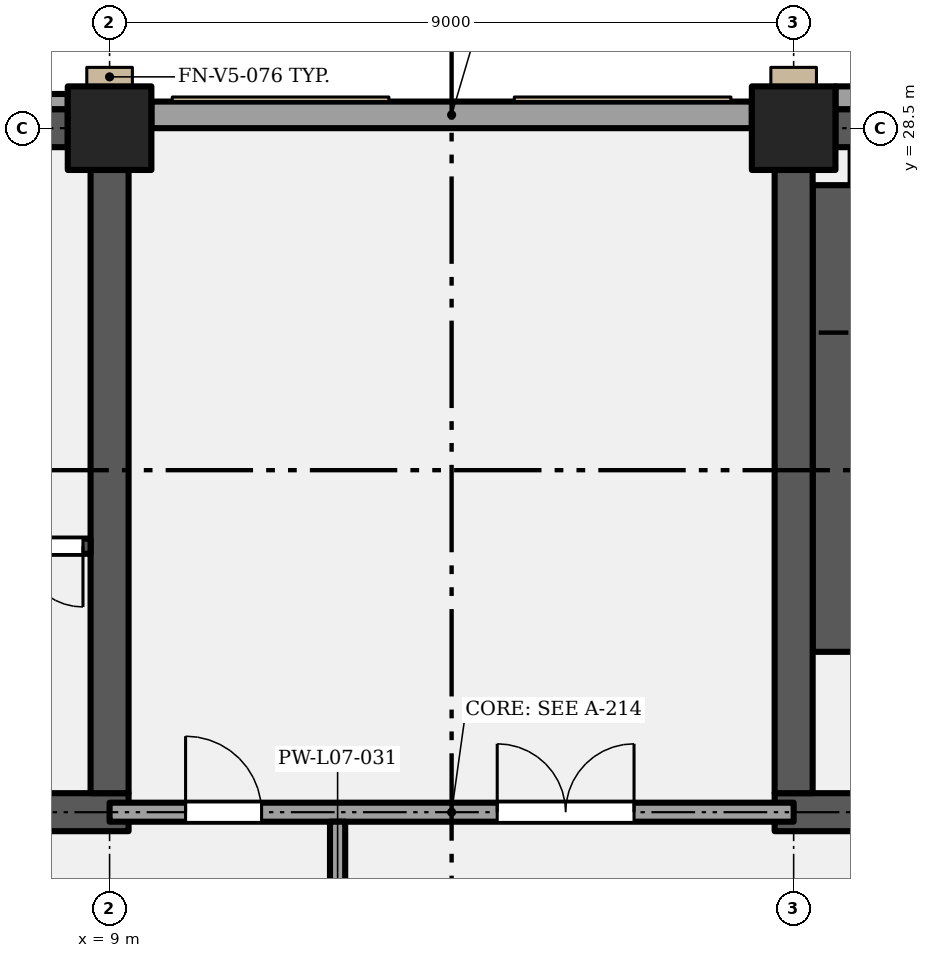
"""IFC4 building model, lengths in metres.
Left out: names, types, materials, properties, quantities, classifications, styles, units other than length and angle.
Written with IfcOpenShell. Run it as: python <this file> out.ifc"""

import sys

from ifc_helpers import new_model, si_unit, direction, frame, frame_2d, origin, origin_2d, place, context, subcontext, project, spatial, rectangle, extrude, element, fill, save


model = new_model("IFC4")
c1 = context("Model", 3, precision=1e-05, world=origin(), true_north=direction((0.0, 1.0)))
c2 = subcontext(c1, "Body", "Model", "MODEL_VIEW")
j1 = project(units=[si_unit("LENGTHUNIT", "METRE"), si_unit("PLANEANGLEUNIT", "RADIAN")], contexts=[c1])
p1 = place(None, origin())
s1 = spatial("IfcSite", under=j1, at=p1, CompositionType="ELEMENT")
p2 = place(p1, origin())
s2 = spatial("IfcBuilding", under=s1, at=p2, CompositionType="ELEMENT")
p3 = place(p2, frame((0.0, 0.0, 39.0)))
s3 = spatial("IfcBuildingStorey", under=s2, at=p3, CompositionType="ELEMENT", Elevation=39.0)
for number, where, z_axis, x_axis in (
    (1, (9.0, 28.5, 0.0), (0.0, 0.0, 1.0), (1.0, 0.0, 0.0)),
    (2, (18.0, 28.5, 0.0), (0.0, 0.0, 1.0), (1.0, 0.0, 0.0)),
):
    element("IfcColumn", number, at=place(p3, frame(where, z_axis=z_axis, x_axis=x_axis)), inside=s3, PredefinedType="COLUMN", context=c2, shape_type="SweptSolid", body=[
        extrude(rectangle(XDim=1.1, YDim=1.1, at=origin_2d()), origin(), (0.0, 0.0, 1.0), 5.4),
    ])
p4 = place(p3, frame((-0.25, 19.5, 0.0), z_axis=(0.0, 0.0, 1.0), x_axis=(1.0, 0.0, 0.0)))
e3 = element("IfcWall", 3, at=p4, inside=s3, PredefinedType="SHEAR", context=c2, shape_type="SweptSolid", body=[
    extrude(rectangle(XDim=9.5, YDim=0.5, at=frame_2d((4.75, 0.0))), origin(), (0.0, 0.0, 1.0), 5.15),
])
p5 = place(p4, frame((1.9, 0.0, 0.0)))
e4 = element("IfcOpeningElement", 4, at=p5, cuts=e3, PredefinedType="OPENING", context=c2, shape_type="SweptSolid", body=[
    extrude(rectangle(XDim=1.2, YDim=2.1, at=frame_2d((0.6, 1.05))), frame((0.0, 0.26, 0.0), z_axis=(0.0, -1.0, 0.0), x_axis=(1.0, 0.0, 0.0)), (0.0, 0.0, 1.0), 0.52),
])
p6 = place(p4, frame((6.4, 0.0, 0.0)))
e5 = element("IfcOpeningElement", 5, at=p6, cuts=e3, PredefinedType="OPENING", context=c2, shape_type="SweptSolid", body=[
    extrude(rectangle(XDim=1.2, YDim=2.1, at=frame_2d((0.6, 1.05))), frame((0.0, 0.26, 0.0), z_axis=(0.0, -1.0, 0.0), x_axis=(1.0, 0.0, 0.0)), (0.0, 0.0, 1.0), 0.52),
])
p7 = place(p3, frame((17.75, 19.5, 0.0), z_axis=(0.0, 0.0, 1.0), x_axis=(1.0, 0.0, 0.0)))
e6 = element("IfcWall", 6, at=p7, inside=s3, PredefinedType="SHEAR", context=c2, shape_type="SweptSolid", body=[
    extrude(rectangle(XDim=9.5, YDim=0.5, at=frame_2d((4.75, 0.0))), origin(), (0.0, 0.0, 1.0), 5.15),
])
p8 = place(p7, frame((1.9, 0.0, 0.0)))
e7 = element("IfcOpeningElement", 7, at=p8, cuts=e6, PredefinedType="OPENING", context=c2, shape_type="SweptSolid", body=[
    extrude(rectangle(XDim=1.2, YDim=2.1, at=frame_2d((0.6, 1.05))), frame((0.0, 0.26, 0.0), z_axis=(0.0, -1.0, 0.0), x_axis=(1.0, 0.0, 0.0)), (0.0, 0.0, 1.0), 0.52),
])
p9 = place(p7, frame((7.95, 0.0, 0.0), z_axis=(0.0, 0.0, 1.0), x_axis=(-1.0, 0.0, 0.0)))
e8 = element("IfcOpeningElement", 8, at=p9, cuts=e6, PredefinedType="OPENING", context=c2, shape_type="SweptSolid", body=[
    extrude(rectangle(XDim=1.8, YDim=2.1, at=frame_2d((0.9, 1.05))), frame((0.0, 0.26, 0.0), z_axis=(0.0, -1.0, 0.0), x_axis=(1.0, 0.0, 0.0)), (0.0, 0.0, 1.0), 0.52),
])
for number, where, z_axis, x_axis in (
    (9, (9.0, 19.75, 0.0), (0.0, 0.0, 1.0), (0.0, 1.0, 0.0)),
    (10, (18.0, 19.75, 0.0), (0.0, 0.0, 1.0), (0.0, 1.0, 0.0)),
):
    element("IfcWall", number, at=place(p3, frame(where, z_axis=z_axis, x_axis=x_axis)), inside=s3, PredefinedType="SHEAR", context=c2, shape_type="SweptSolid", body=[
        extrude(rectangle(XDim=8.2, YDim=0.5, at=frame_2d((4.1, 0.0))), origin(), (0.0, 0.0, 1.0), 5.15),
    ])
p10 = place(p3, frame((0.45, 28.5, 0.0), z_axis=(0.0, 0.0, 1.0), x_axis=(1.0, 0.0, 0.0)))
e11 = element("IfcWall", 11, at=p10, inside=s3, PredefinedType="SHEAR", context=c2, shape_type="SweptSolid", body=[
    extrude(rectangle(XDim=8.0, YDim=0.5, at=frame_2d((4.0, 0.0))), origin(), (0.0, 0.0, 1.0), 5.15),
])
p11 = place(p3, frame((18.55, 28.5, 0.0), z_axis=(0.0, 0.0, 1.0), x_axis=(1.0, 0.0, 0.0)))
e12 = element("IfcWall", 12, at=p11, inside=s3, PredefinedType="SHEAR", context=c2, shape_type="SweptSolid", body=[
    extrude(rectangle(XDim=7.9, YDim=0.5, at=frame_2d((3.95, 0.0))), origin(), (0.0, 0.0, 1.0), 5.15),
])
p12 = place(p3, frame((0.45, 28.85, 0.0), z_axis=(0.0, 0.0, 1.0), x_axis=(1.0, 0.0, 0.0)))
e13 = element("IfcWall", 13, at=p12, inside=s3, PredefinedType="SOLIDWALL", context=c2, shape_type="SweptSolid", body=[
    extrude(rectangle(XDim=8.0, YDim=0.2, at=frame_2d((4.0, 0.0))), origin(), (0.0, 0.0, 1.0), 5.15),
])
p13 = place(p3, frame((9.55, 28.675, 0.0), z_axis=(0.0, 0.0, 1.0), x_axis=(1.0, 0.0, 0.0)))
e14 = element("IfcWall", 14, at=p13, inside=s3, PredefinedType="SOLIDWALL", context=c2, shape_type="SweptSolid", body=[
    extrude(rectangle(XDim=7.9, YDim=0.35, at=frame_2d((3.95, 0.0))), origin(), (0.0, 0.0, 1.0), 5.15),
])
p14 = place(p3, frame((18.55, 28.9, 0.0), z_axis=(0.0, 0.0, 1.0), x_axis=(1.0, 0.0, 0.0)))
e15 = element("IfcWall", 15, at=p14, inside=s3, PredefinedType="SOLIDWALL", context=c2, shape_type="SweptSolid", body=[
    extrude(rectangle(XDim=7.9, YDim=0.3, at=frame_2d((3.95, 0.0))), origin(), (0.0, 0.0, 1.0), 5.15),
])
p15 = place(p3, frame((9.0, 19.5, 0.0), z_axis=(0.0, 0.0, 1.0), x_axis=(1.0, 0.0, 0.0)))
e16 = element("IfcWall", 16, at=p15, inside=s3, PredefinedType="PARTITIONING", context=c2, shape_type="SweptSolid", body=[
    extrude(rectangle(XDim=9.0, YDim=0.25, at=frame_2d((4.5, 0.0))), origin(), (0.0, 0.0, 1.0), 5.15),
])
p16 = place(p15, frame((5.1, 0.0, 0.0)))
e17 = element("IfcOpeningElement", 17, at=p16, cuts=e16, PredefinedType="OPENING", context=c2, shape_type="SweptSolid", body=[
    extrude(rectangle(XDim=1.8, YDim=2.4, at=frame_2d((0.9, 1.2))), frame((0.0, 0.135, 0.0), z_axis=(0.0, -1.0, 0.0), x_axis=(1.0, 0.0, 0.0)), (0.0, 0.0, 1.0), 0.27),
])
p17 = place(p15, frame((1.0, 0.0, 0.0)))
e18 = element("IfcOpeningElement", 18, at=p17, cuts=e16, PredefinedType="OPENING", context=c2, shape_type="SweptSolid", body=[
    extrude(rectangle(XDim=1.0, YDim=2.1, at=frame_2d((0.5, 1.05))), frame((0.0, 0.135, 0.0), z_axis=(0.0, -1.0, 0.0), x_axis=(1.0, 0.0, 0.0)), (0.0, 0.0, 1.0), 0.27),
])
p18 = place(p3, frame((7.5, 23.0, 0.0), z_axis=(0.0, 0.0, 1.0), x_axis=(1.0, 0.0, 0.0)))
e19 = element("IfcWall", 19, at=p18, inside=s3, PredefinedType="SHEAR", context=c2, shape_type="SweptSolid", body=[
    extrude(rectangle(XDim=1.25, YDim=0.2, at=frame_2d((0.625, 0.0))), origin(), (0.0, 0.0, 1.0), 5.15),
])
p19 = place(p18, frame((1.15, 0.0, 0.0), z_axis=(0.0, 0.0, 1.0), x_axis=(-1.0, 0.0, 0.0)))
e20 = element("IfcOpeningElement", 20, at=p19, cuts=e19, PredefinedType="OPENING", context=c2, shape_type="SweptSolid", body=[
    extrude(rectangle(XDim=0.8, YDim=2.0, at=frame_2d((0.4, 1.0))), frame((0.0, 0.11, 0.0), z_axis=(0.0, -1.0, 0.0), x_axis=(1.0, 0.0, 0.0)), (0.0, 0.0, 1.0), 0.22),
])
p20 = place(p3, frame((12.0, 17.225, 0.0), z_axis=(0.0, 0.0, 1.0), x_axis=(0.0, 1.0, 0.0)))
e21 = element("IfcWall", 21, at=p20, inside=s3, PredefinedType="PARTITIONING", context=c2, shape_type="SweptSolid", body=[
    extrude(rectangle(XDim=2.15, YDim=0.2, at=frame_2d((1.075, 0.0))), origin(), (0.0, 0.0, 1.0), 5.15),
])
p21 = place(p3, frame((18.6, 21.61, 0.0), z_axis=(0.0, 0.0, 1.0), x_axis=(0.0, 1.0, 0.0)))
e22 = element("IfcWall", 22, at=p21, inside=s3, PredefinedType="SHEAR", context=c2, shape_type="SweptSolid", body=[
    extrude(rectangle(XDim=6.14, YDim=0.7, at=frame_2d((3.07, 0.0))), origin(), (0.0, 0.0, 1.0), 2.587),
])
p22 = place(p19, origin())
e23 = element("IfcDoor", 23, at=p22, inside=s3, OperationType="SINGLE_SWING_LEFT", PredefinedType="DOOR", context=c2, shape_type="SweptSolid", body=[
    extrude(rectangle(XDim=0.8, YDim=2.0, at=frame_2d((0.4, 1.0))), frame((0.0, 0.025, 0.0), z_axis=(0.0, -1.0, 0.0), x_axis=(1.0, 0.0, 0.0)), (0.0, 0.0, 1.0), 0.05),
])
fill(e20, e23)
p23 = place(p16, origin())
e24 = element("IfcDoor", 24, at=p23, inside=s3, OperationType="DOUBLE_DOOR_SINGLE_SWING", PredefinedType="DOOR", context=c2, shape_type="SweptSolid", body=[
    extrude(rectangle(XDim=1.8, YDim=2.4, at=frame_2d((0.9, 1.2))), frame((0.0, 0.025, 0.0), z_axis=(0.0, -1.0, 0.0), x_axis=(1.0, 0.0, 0.0)), (0.0, 0.0, 1.0), 0.05),
])
fill(e17, e24)
p24 = place(p17, origin())
e25 = element("IfcDoor", 25, at=p24, inside=s3, OperationType="SINGLE_SWING_LEFT", PredefinedType="DOOR", context=c2, shape_type="SweptSolid", body=[
    extrude(rectangle(XDim=1.0, YDim=2.1, at=frame_2d((0.5, 1.05))), frame((0.0, 0.025, 0.0), z_axis=(0.0, -1.0, 0.0), x_axis=(1.0, 0.0, 0.0)), (0.0, 0.0, 1.0), 0.05),
])
fill(e18, e25)
save(model, sys.argv[1])
